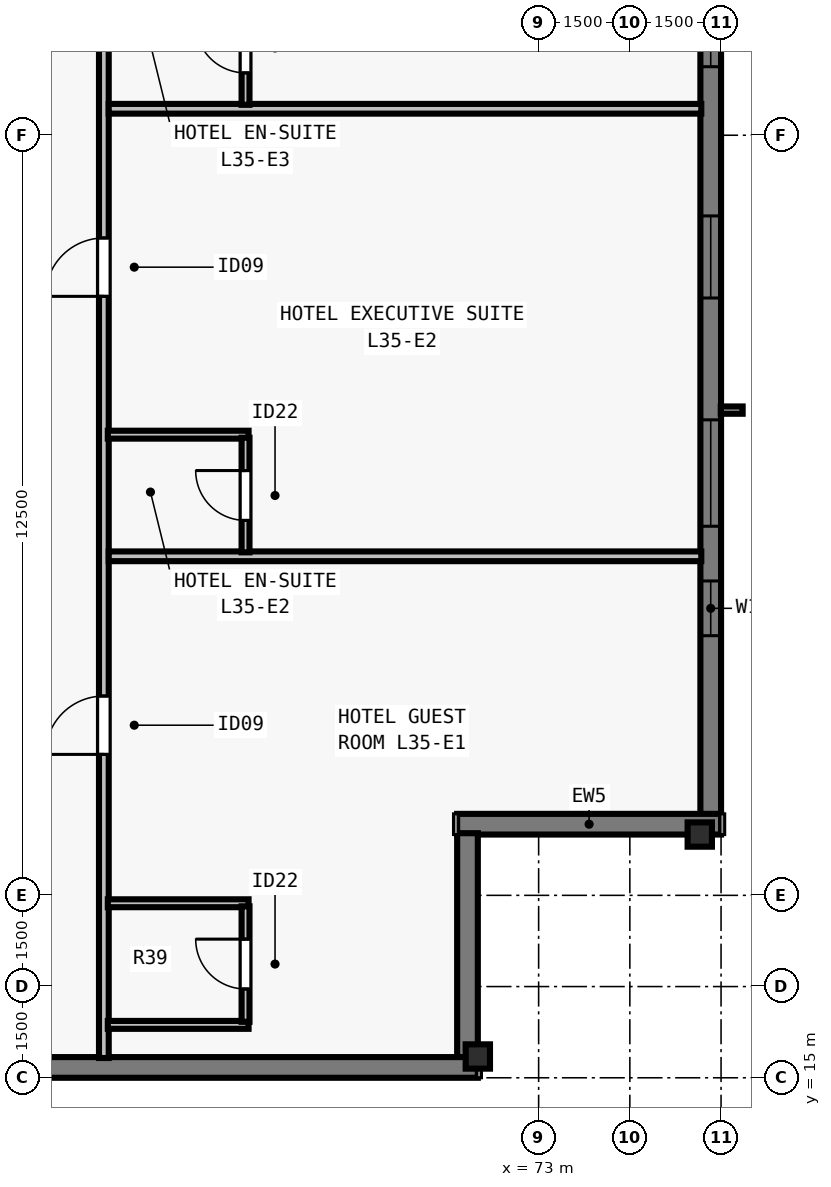
"""IFC4 building model, lengths in metres.
Left out: names, types, materials, properties, quantities, classifications, styles, units other than length and angle.
Written with IfcOpenShell. Run it as: python <this file> out.ifc"""

import sys

from ifc_helpers import new_model, si_unit, direction, frame, frame_2d, origin, origin_2d, place, context, subcontext, project, spatial, rectangle, i_section, extrude, element, fill, save


model = new_model("IFC4")
c1 = context("Model", 3, precision=1e-05, world=origin(), true_north=direction((0.0, 1.0)))
c2 = subcontext(c1, "Body", "Model", "MODEL_VIEW")
j1 = project(units=[si_unit("LENGTHUNIT", "METRE"), si_unit("PLANEANGLEUNIT", "RADIAN")], contexts=[c1])
p1 = place(None, origin())
s1 = spatial("IfcSite", under=j1, at=p1, CompositionType="ELEMENT")
p2 = place(p1, origin())
s2 = spatial("IfcBuilding", under=s1, at=p2, CompositionType="ELEMENT")
p3 = place(p2, frame((0.0, 0.0, 130.5)))
s3 = spatial("IfcBuildingStorey", under=s2, at=p3, CompositionType="ELEMENT", Elevation=130.5)
for number, where, z_axis, x_axis in (
    (1, (72.0, 15.35, 0.0), (0.0, 0.0, 1.0), (1.0, 0.0, 0.0)),
    (2, (75.65, 19.0, 0.0), (0.0, 0.0, 1.0), (0.0, 1.0, 0.0)),
):
    element("IfcColumn", number, at=place(p3, frame(where, z_axis=z_axis, x_axis=x_axis)), inside=s3, PredefinedType="COLUMN", context=c2, shape_type="SweptSolid", body=[
        extrude(i_section(OverallWidth=0.4, OverallDepth=0.4, WebThickness=0.022, FlangeThickness=0.036, at=origin_2d()), origin(), (0.0, 0.0, 1.0), 3.5),
    ])
p4 = place(p3, frame((75.83, 59.0, 0.0), z_axis=(0.0, 0.0, 1.0), x_axis=(0.0, -1.0, 0.0)))
e3 = element("IfcWall", 3, at=p4, inside=s3, PredefinedType="SOLIDWALL", context=c2, shape_type="SweptSolid", body=[
    extrude(rectangle(XDim=39.682, YDim=0.34, at=frame_2d((19.841, 0.0))), origin(), (0.0, 0.0, 1.0), 3.28),
])
p5 = place(p4, frame((4.752, 0.0, 0.8)))
e4 = element("IfcOpeningElement", 4, at=p5, cuts=e3, PredefinedType="OPENING", context=c2, shape_type="SweptSolid", body=[
    extrude(rectangle(XDim=1.75, YDim=1.66, at=frame_2d((0.875, 0.83))), frame((0.0, 0.18, 0.0), z_axis=(0.0, -1.0, 0.0), x_axis=(1.0, 0.0, 0.0)), (0.0, 0.0, 1.0), 0.36),
])
p6 = place(p4, frame((8.505, 0.0, 0.8)))
e5 = element("IfcOpeningElement", 5, at=p6, cuts=e3, PredefinedType="OPENING", context=c2, shape_type="SweptSolid", body=[
    extrude(rectangle(XDim=1.35, YDim=1.66, at=frame_2d((0.675, 0.83))), frame((0.0, 0.18, 0.0), z_axis=(0.0, -1.0, 0.0), x_axis=(1.0, 0.0, 0.0)), (0.0, 0.0, 1.0), 0.36),
])
p7 = place(p4, frame((12.709, 0.0, 0.8)))
e6 = element("IfcOpeningElement", 6, at=p7, cuts=e3, PredefinedType="OPENING", context=c2, shape_type="SweptSolid", body=[
    extrude(rectangle(XDim=1.75, YDim=1.66, at=frame_2d((0.875, 0.83))), frame((0.0, 0.18, 0.0), z_axis=(0.0, -1.0, 0.0), x_axis=(1.0, 0.0, 0.0)), (0.0, 0.0, 1.0), 0.36),
])
p8 = place(p4, frame((16.062, 0.0, 0.8)))
e7 = element("IfcOpeningElement", 7, at=p8, cuts=e3, PredefinedType="OPENING", context=c2, shape_type="SweptSolid", body=[
    extrude(rectangle(XDim=1.35, YDim=1.66, at=frame_2d((0.675, 0.83))), frame((0.0, 0.18, 0.0), z_axis=(0.0, -1.0, 0.0), x_axis=(1.0, 0.0, 0.0)), (0.0, 0.0, 1.0), 0.36),
])
p9 = place(p4, frame((20.216, 0.0, 0.8)))
e8 = element("IfcOpeningElement", 8, at=p9, cuts=e3, PredefinedType="OPENING", context=c2, shape_type="SweptSolid", body=[
    extrude(rectangle(XDim=1.75, YDim=1.66, at=frame_2d((0.875, 0.83))), frame((0.0, 0.18, 0.0), z_axis=(0.0, -1.0, 0.0), x_axis=(1.0, 0.0, 0.0)), (0.0, 0.0, 1.0), 0.36),
])
p10 = place(p4, frame((22.719, 0.0, 0.8)))
e9 = element("IfcOpeningElement", 9, at=p10, cuts=e3, PredefinedType="OPENING", context=c2, shape_type="SweptSolid", body=[
    extrude(rectangle(XDim=1.35, YDim=1.66, at=frame_2d((0.675, 0.83))), frame((0.0, 0.18, 0.0), z_axis=(0.0, -1.0, 0.0), x_axis=(1.0, 0.0, 0.0)), (0.0, 0.0, 1.0), 0.36),
])
p11 = place(p4, frame((25.623, 0.0, 0.8)))
e10 = element("IfcOpeningElement", 10, at=p11, cuts=e3, PredefinedType="OPENING", context=c2, shape_type="SweptSolid", body=[
    extrude(rectangle(XDim=1.75, YDim=1.66, at=frame_2d((0.875, 0.83))), frame((0.0, 0.18, 0.0), z_axis=(0.0, -1.0, 0.0), x_axis=(1.0, 0.0, 0.0)), (0.0, 0.0, 1.0), 0.36),
])
p12 = place(p4, frame((29.827, 0.0, 0.8)))
e11 = element("IfcOpeningElement", 11, at=p12, cuts=e3, PredefinedType="OPENING", context=c2, shape_type="SweptSolid", body=[
    extrude(rectangle(XDim=1.35, YDim=1.66, at=frame_2d((0.675, 0.83))), frame((0.0, 0.18, 0.0), z_axis=(0.0, -1.0, 0.0), x_axis=(1.0, 0.0, 0.0)), (0.0, 0.0, 1.0), 0.36),
])
p13 = place(p4, frame((33.18, 0.0, 0.8)))
e12 = element("IfcOpeningElement", 12, at=p13, cuts=e3, PredefinedType="OPENING", context=c2, shape_type="SweptSolid", body=[
    extrude(rectangle(XDim=1.75, YDim=1.66, at=frame_2d((0.875, 0.83))), frame((0.0, 0.18, 0.0), z_axis=(0.0, -1.0, 0.0), x_axis=(1.0, 0.0, 0.0)), (0.0, 0.0, 1.0), 0.36),
])
p14 = place(p4, frame((35.83, 0.0, 0.8)))
e13 = element("IfcOpeningElement", 13, at=p14, cuts=e3, PredefinedType="OPENING", context=c2, shape_type="SweptSolid", body=[
    extrude(rectangle(XDim=0.9, YDim=1.66, at=frame_2d((0.45, 0.83))), frame((0.0, 0.18, 0.0), z_axis=(0.0, -1.0, 0.0), x_axis=(1.0, 0.0, 0.0)), (0.0, 0.0, 1.0), 0.36),
])
p15 = place(p3, frame((76.0, 19.17, 0.0), z_axis=(0.0, 0.0, 1.0), x_axis=(-1.0, 0.0, 0.0)))
e14 = element("IfcWall", 14, at=p15, inside=s3, PredefinedType="SOLIDWALL", context=c2, shape_type="SweptSolid", body=[
    extrude(rectangle(XDim=4.34, YDim=0.34, at=frame_2d((2.17, 0.0))), origin(), (0.0, 0.0, 1.0), 3.28),
])
p16 = place(p3, frame((71.83, 19.022, 0.0), z_axis=(0.0, 0.0, 1.0), x_axis=(0.0, -1.0, 0.0)))
e15 = element("IfcWall", 15, at=p16, inside=s3, PredefinedType="SOLIDWALL", context=c2, shape_type="SweptSolid", body=[
    extrude(rectangle(XDim=3.704, YDim=0.34, at=frame_2d((1.852, 0.0))), origin(), (0.0, 0.0, 1.0), 3.28),
])
p17 = place(p3, frame((72.0, 15.17, 0.0), z_axis=(0.0, 0.0, 1.0), x_axis=(-1.0, 0.0, 0.0)))
e16 = element("IfcWall", 16, at=p17, inside=s3, PredefinedType="SOLIDWALL", context=c2, shape_type="SweptSolid", body=[
    extrude(rectangle(XDim=39.682, YDim=0.34, at=frame_2d((19.841, 0.0))), origin(), (0.0, 0.0, 1.0), 3.28),
])
p18 = place(p17, frame((8.955, 0.0, 0.8)))
e17 = element("IfcOpeningElement", 17, at=p18, cuts=e16, PredefinedType="OPENING", context=c2, shape_type="SweptSolid", body=[
    extrude(rectangle(XDim=1.35, YDim=1.66, at=frame_2d((0.675, 0.83))), frame((0.0, 0.18, 0.0), z_axis=(0.0, -1.0, 0.0), x_axis=(1.0, 0.0, 0.0)), (0.0, 0.0, 1.0), 0.36),
])
p19 = place(p17, frame((11.859, 0.0, 0.8)))
e18 = element("IfcOpeningElement", 18, at=p19, cuts=e16, PredefinedType="OPENING", context=c2, shape_type="SweptSolid", body=[
    extrude(rectangle(XDim=1.75, YDim=1.66, at=frame_2d((0.875, 0.83))), frame((0.0, 0.18, 0.0), z_axis=(0.0, -1.0, 0.0), x_axis=(1.0, 0.0, 0.0)), (0.0, 0.0, 1.0), 0.36),
])
p20 = place(p17, frame((16.062, 0.0, 0.8)))
e19 = element("IfcOpeningElement", 19, at=p20, cuts=e16, PredefinedType="OPENING", context=c2, shape_type="SweptSolid", body=[
    extrude(rectangle(XDim=1.35, YDim=1.66, at=frame_2d((0.675, 0.83))), frame((0.0, 0.18, 0.0), z_axis=(0.0, -1.0, 0.0), x_axis=(1.0, 0.0, 0.0)), (0.0, 0.0, 1.0), 0.36),
])
p21 = place(p17, frame((18.966, 0.0, 0.8)))
e20 = element("IfcOpeningElement", 20, at=p21, cuts=e16, PredefinedType="OPENING", context=c2, shape_type="SweptSolid", body=[
    extrude(rectangle(XDim=1.75, YDim=1.66, at=frame_2d((0.875, 0.83))), frame((0.0, 0.18, 0.0), z_axis=(0.0, -1.0, 0.0), x_axis=(1.0, 0.0, 0.0)), (0.0, 0.0, 1.0), 0.36),
])
p22 = place(p17, frame((21.469, 0.0, 0.8)))
e21 = element("IfcOpeningElement", 21, at=p22, cuts=e16, PredefinedType="OPENING", context=c2, shape_type="SweptSolid", body=[
    extrude(rectangle(XDim=1.35, YDim=1.66, at=frame_2d((0.675, 0.83))), frame((0.0, 0.18, 0.0), z_axis=(0.0, -1.0, 0.0), x_axis=(1.0, 0.0, 0.0)), (0.0, 0.0, 1.0), 0.36),
])
p23 = place(p17, frame((26.073, 0.0, 0.8)))
e22 = element("IfcOpeningElement", 22, at=p23, cuts=e16, PredefinedType="OPENING", context=c2, shape_type="SweptSolid", body=[
    extrude(rectangle(XDim=1.75, YDim=1.66, at=frame_2d((0.875, 0.83))), frame((0.0, 0.18, 0.0), z_axis=(0.0, -1.0, 0.0), x_axis=(1.0, 0.0, 0.0)), (0.0, 0.0, 1.0), 0.36),
])
p24 = place(p17, frame((28.577, 0.0, 0.8)))
e23 = element("IfcOpeningElement", 23, at=p24, cuts=e16, PredefinedType="OPENING", context=c2, shape_type="SweptSolid", body=[
    extrude(rectangle(XDim=1.35, YDim=1.66, at=frame_2d((0.675, 0.83))), frame((0.0, 0.18, 0.0), z_axis=(0.0, -1.0, 0.0), x_axis=(1.0, 0.0, 0.0)), (0.0, 0.0, 1.0), 0.36),
])
p25 = place(p3, frame((65.85, 15.325, 0.0), z_axis=(0.0, 0.0, 1.0), x_axis=(0.0, 1.0, 0.0)))
e24 = element("IfcWall", 24, at=p25, inside=s3, PredefinedType="PARTITIONING", context=c2, shape_type="SweptSolid", body=[
    extrude(rectangle(XDim=47.35, YDim=0.16, at=frame_2d((23.675, 0.0))), origin(), (0.0, 0.0, 1.0), 2.555),
])
p26 = place(p25, frame((4.993, 0.0, 0.0)))
e25 = element("IfcOpeningElement", 25, at=p26, cuts=e24, PredefinedType="OPENING", context=c2, shape_type="SweptSolid", body=[
    extrude(rectangle(XDim=0.96, YDim=2.15, at=frame_2d((0.48, 1.075))), frame((0.0, 0.09, 0.0), z_axis=(0.0, -1.0, 0.0), x_axis=(1.0, 0.0, 0.0)), (0.0, 0.0, 1.0), 0.18),
])
p27 = place(p25, frame((12.525, 0.0, 0.0)))
e26 = element("IfcOpeningElement", 26, at=p27, cuts=e24, PredefinedType="OPENING", context=c2, shape_type="SweptSolid", body=[
    extrude(rectangle(XDim=0.96, YDim=2.15, at=frame_2d((0.48, 1.075))), frame((0.0, 0.09, 0.0), z_axis=(0.0, -1.0, 0.0), x_axis=(1.0, 0.0, 0.0)), (0.0, 0.0, 1.0), 0.18),
])
p28 = place(p25, frame((20.385, 0.0, 0.0)))
e27 = element("IfcOpeningElement", 27, at=p28, cuts=e24, PredefinedType="OPENING", context=c2, shape_type="SweptSolid", body=[
    extrude(rectangle(XDim=0.96, YDim=2.15, at=frame_2d((0.48, 1.075))), frame((0.0, 0.09, 0.0), z_axis=(0.0, -1.0, 0.0), x_axis=(1.0, 0.0, 0.0)), (0.0, 0.0, 1.0), 0.18),
])
p29 = place(p25, frame((28.246, 0.0, 0.0)))
e28 = element("IfcOpeningElement", 28, at=p29, cuts=e24, PredefinedType="OPENING", context=c2, shape_type="SweptSolid", body=[
    extrude(rectangle(XDim=0.96, YDim=2.15, at=frame_2d((0.48, 1.075))), frame((0.0, 0.09, 0.0), z_axis=(0.0, -1.0, 0.0), x_axis=(1.0, 0.0, 0.0)), (0.0, 0.0, 1.0), 0.18),
])
p30 = place(p25, frame((36.105, 0.0, 0.0)))
e29 = element("IfcOpeningElement", 29, at=p30, cuts=e24, PredefinedType="OPENING", context=c2, shape_type="SweptSolid", body=[
    extrude(rectangle(XDim=0.96, YDim=2.15, at=frame_2d((0.48, 1.075))), frame((0.0, 0.09, 0.0), z_axis=(0.0, -1.0, 0.0), x_axis=(1.0, 0.0, 0.0)), (0.0, 0.0, 1.0), 0.18),
])
p31 = place(p25, frame((44.068, 0.0, 0.0)))
e30 = element("IfcOpeningElement", 30, at=p31, cuts=e24, PredefinedType="OPENING", context=c2, shape_type="SweptSolid", body=[
    extrude(rectangle(XDim=0.96, YDim=2.15, at=frame_2d((0.48, 1.075))), frame((0.0, 0.09, 0.0), z_axis=(0.0, -1.0, 0.0), x_axis=(1.0, 0.0, 0.0)), (0.0, 0.0, 1.0), 0.18),
])
for number, where, z_axis, x_axis in (
    (31, (65.915, 15.87, 0.0), (0.0, 0.0, 1.0), (1.0, 0.0, 0.0)),
    (32, (65.915, 17.87, 0.0), (0.0, 0.0, 1.0), (1.0, 0.0, 0.0)),
):
    element("IfcWall", number, at=place(p3, frame(where, z_axis=z_axis, x_axis=x_axis)), inside=s3, PredefinedType="PLUMBINGWALL", context=c2, shape_type="SweptSolid", body=[
        extrude(rectangle(XDim=2.315, YDim=0.13, at=frame_2d((1.157, 0.0))), origin(), (0.0, 0.0, 1.0), 3.28),
    ])
p32 = place(p3, frame((68.18, 15.92, 0.0), z_axis=(0.0, 0.0, 1.0), x_axis=(0.0, 1.0, 0.0)))
e33 = element("IfcWall", 33, at=p32, inside=s3, PredefinedType="PLUMBINGWALL", context=c2, shape_type="SweptSolid", body=[
    extrude(rectangle(XDim=1.9, YDim=0.13, at=frame_2d((0.95, 0.0))), origin(), (0.0, 0.0, 1.0), 3.28),
])
p33 = place(p32, frame((0.54, 0.0, 0.0)))
e34 = element("IfcOpeningElement", 34, at=p33, cuts=e33, PredefinedType="OPENING", context=c2, shape_type="SweptSolid", body=[
    extrude(rectangle(XDim=0.82, YDim=2.1, at=frame_2d((0.41, 1.05))), frame((0.0, 0.075, 0.0), z_axis=(0.0, -1.0, 0.0), x_axis=(1.0, 0.0, 0.0)), (0.0, 0.0, 1.0), 0.15),
])
p34 = place(p3, frame((65.93, 23.576, 0.0), z_axis=(0.0, 0.0, 1.0), x_axis=(1.0, 0.0, 0.0)))
e35 = element("IfcWall", 35, at=p34, inside=s3, PredefinedType="PARTITIONING", context=c2, shape_type="SweptSolid", body=[
    extrude(rectangle(XDim=9.745, YDim=0.16, at=frame_2d((4.873, 0.0))), origin(), (0.0, 0.0, 1.0), 2.896),
])
p35 = place(p3, frame((65.915, 25.576, 0.0), z_axis=(0.0, 0.0, 1.0), x_axis=(1.0, 0.0, 0.0)))
e36 = element("IfcWall", 36, at=p35, inside=s3, PredefinedType="PLUMBINGWALL", context=c2, shape_type="SweptSolid", body=[
    extrude(rectangle(XDim=2.315, YDim=0.13, at=frame_2d((1.157, 0.0))), origin(), (0.0, 0.0, 1.0), 2.896),
])
p36 = place(p3, frame((68.18, 23.641, 0.0), z_axis=(0.0, 0.0, 1.0), x_axis=(0.0, 1.0, 0.0)))
e37 = element("IfcWall", 37, at=p36, inside=s3, PredefinedType="PLUMBINGWALL", context=c2, shape_type="SweptSolid", body=[
    extrude(rectangle(XDim=1.885, YDim=0.13, at=frame_2d((0.942, 0.0))), origin(), (0.0, 0.0, 1.0), 3.28),
])
p37 = place(p36, frame((0.525, 0.0, 0.0)))
e38 = element("IfcOpeningElement", 38, at=p37, cuts=e37, PredefinedType="OPENING", context=c2, shape_type="SweptSolid", body=[
    extrude(rectangle(XDim=0.82, YDim=2.1, at=frame_2d((0.41, 1.05))), frame((0.0, 0.075, 0.0), z_axis=(0.0, -1.0, 0.0), x_axis=(1.0, 0.0, 0.0)), (0.0, 0.0, 1.0), 0.15),
])
p38 = place(p3, frame((65.93, 30.935, 0.0), z_axis=(0.0, 0.0, 1.0), x_axis=(1.0, 0.0, 0.0)))
e39 = element("IfcWall", 39, at=p38, inside=s3, PredefinedType="PARTITIONING", context=c2, shape_type="SweptSolid", body=[
    extrude(rectangle(XDim=9.745, YDim=0.16, at=frame_2d((4.873, 0.0))), origin(), (0.0, 0.0, 1.0), 3.28),
])
p39 = place(p3, frame((68.18, 31.0, 0.0), z_axis=(0.0, 0.0, 1.0), x_axis=(0.0, 1.0, 0.0)))
e40 = element("IfcWall", 40, at=p39, inside=s3, PredefinedType="PLUMBINGWALL", context=c2, shape_type="SweptSolid", body=[
    extrude(rectangle(XDim=1.885, YDim=0.13, at=frame_2d((0.942, 0.0))), origin(), (0.0, 0.0, 1.0), 3.28),
])
p40 = place(p39, frame((0.525, 0.0, 0.0)))
e41 = element("IfcOpeningElement", 41, at=p40, cuts=e40, PredefinedType="OPENING", context=c2, shape_type="SweptSolid", body=[
    extrude(rectangle(XDim=0.82, YDim=2.1, at=frame_2d((0.41, 1.05))), frame((0.0, 0.075, 0.0), z_axis=(0.0, -1.0, 0.0), x_axis=(1.0, 0.0, 0.0)), (0.0, 0.0, 1.0), 0.15),
])
p41 = place(p11, origin())
e42 = element("IfcWindow", 42, at=p41, inside=s3, PartitioningType="SINGLE_PANEL", PredefinedType="WINDOW", context=c2, shape_type="SweptSolid", body=[
    extrude(rectangle(XDim=1.75, YDim=1.66, at=frame_2d((0.875, 0.83))), frame((0.0, -0.05, 0.0), z_axis=(0.0, -1.0, 0.0), x_axis=(1.0, 0.0, 0.0)), (0.0, 0.0, 1.0), 0.06),
])
fill(e10, e42)
p42 = place(p12, origin())
e43 = element("IfcWindow", 43, at=p42, inside=s3, PartitioningType="SINGLE_PANEL", PredefinedType="WINDOW", context=c2, shape_type="SweptSolid", body=[
    extrude(rectangle(XDim=1.35, YDim=1.66, at=frame_2d((0.675, 0.83))), frame((0.0, -0.05, 0.0), z_axis=(0.0, -1.0, 0.0), x_axis=(1.0, 0.0, 0.0)), (0.0, 0.0, 1.0), 0.06),
])
fill(e11, e43)
p43 = place(p13, origin())
e44 = element("IfcWindow", 44, at=p43, inside=s3, PartitioningType="SINGLE_PANEL", PredefinedType="WINDOW", context=c2, shape_type="SweptSolid", body=[
    extrude(rectangle(XDim=1.75, YDim=1.66, at=frame_2d((0.875, 0.83))), frame((0.0, -0.05, 0.0), z_axis=(0.0, -1.0, 0.0), x_axis=(1.0, 0.0, 0.0)), (0.0, 0.0, 1.0), 0.06),
])
fill(e12, e44)
p44 = place(p14, origin())
e45 = element("IfcWindow", 45, at=p44, inside=s3, PartitioningType="SINGLE_PANEL", PredefinedType="WINDOW", context=c2, shape_type="SweptSolid", body=[
    extrude(rectangle(XDim=0.9, YDim=1.66, at=frame_2d((0.45, 0.83))), frame((0.0, -0.04, 0.0), z_axis=(0.0, -1.0, 0.0), x_axis=(1.0, 0.0, 0.0)), (0.0, 0.0, 1.0), 0.06),
])
fill(e13, e45)
p45 = place(p33, origin())
e46 = element("IfcDoor", 46, at=p45, inside=s3, OperationType="SINGLE_SWING_RIGHT", PredefinedType="DOOR", context=c2, shape_type="SweptSolid", body=[
    extrude(rectangle(XDim=0.82, YDim=2.1, at=frame_2d((0.41, 1.05))), frame((0.0, 0.025, 0.0), z_axis=(0.0, -1.0, 0.0), x_axis=(1.0, 0.0, 0.0)), (0.0, 0.0, 1.0), 0.05),
])
fill(e34, e46)
p46 = place(p26, origin())
e47 = element("IfcDoor", 47, at=p46, inside=s3, OperationType="SINGLE_SWING_LEFT", PredefinedType="DOOR", context=c2, shape_type="SweptSolid", body=[
    extrude(rectangle(XDim=0.96, YDim=2.15, at=frame_2d((0.48, 1.075))), frame((0.0, 0.025, 0.0), z_axis=(0.0, -1.0, 0.0), x_axis=(1.0, 0.0, 0.0)), (0.0, 0.0, 1.0), 0.05),
])
fill(e25, e47)
p47 = place(p37, origin())
e48 = element("IfcDoor", 48, at=p47, inside=s3, OperationType="SINGLE_SWING_RIGHT", PredefinedType="DOOR", context=c2, shape_type="SweptSolid", body=[
    extrude(rectangle(XDim=0.82, YDim=2.1, at=frame_2d((0.41, 1.05))), frame((0.0, 0.025, 0.0), z_axis=(0.0, -1.0, 0.0), x_axis=(1.0, 0.0, 0.0)), (0.0, 0.0, 1.0), 0.05),
])
fill(e38, e48)
p48 = place(p27, origin())
e49 = element("IfcDoor", 49, at=p48, inside=s3, OperationType="SINGLE_SWING_LEFT", PredefinedType="DOOR", context=c2, shape_type="SweptSolid", body=[
    extrude(rectangle(XDim=0.96, YDim=2.15, at=frame_2d((0.48, 1.075))), frame((0.0, 0.025, 0.0), z_axis=(0.0, -1.0, 0.0), x_axis=(1.0, 0.0, 0.0)), (0.0, 0.0, 1.0), 0.05),
])
fill(e26, e49)
p49 = place(p40, origin())
e50 = element("IfcDoor", 50, at=p49, inside=s3, OperationType="SINGLE_SWING_RIGHT", PredefinedType="DOOR", context=c2, shape_type="SweptSolid", body=[
    extrude(rectangle(XDim=0.82, YDim=2.1, at=frame_2d((0.41, 1.05))), frame((0.0, 0.025, 0.0), z_axis=(0.0, -1.0, 0.0), x_axis=(1.0, 0.0, 0.0)), (0.0, 0.0, 1.0), 0.05),
])
fill(e41, e50)
save(model, sys.argv[1])
